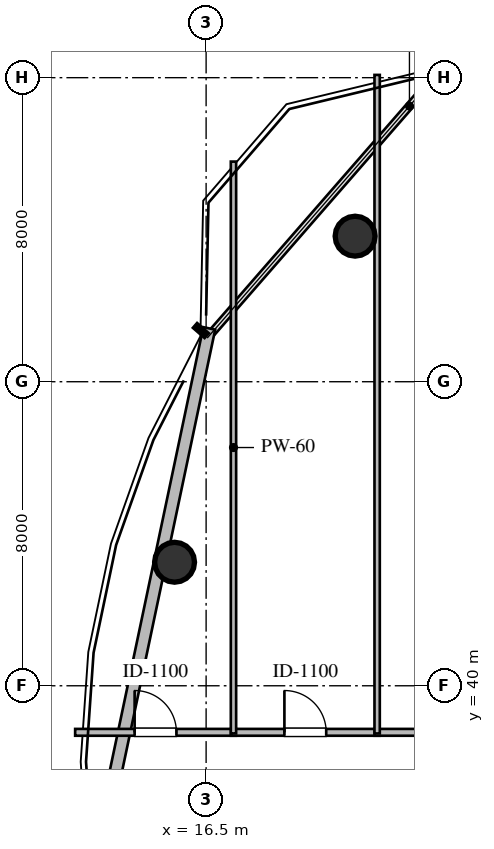
"""IFC4 building model, lengths in metres.
Left out: names, types, materials, properties, quantities, classifications, styles, units other than length and angle.
Written with IfcOpenShell. Run it as: python <this file> out.ifc"""

import sys

from ifc_helpers import new_model, si_unit, direction, frame, frame_2d, origin, origin_2d, place, context, subcontext, project, spatial, rectangle, circle, extrude, element, fill, save


model = new_model("IFC4")
c1 = context("Model", 3, precision=1e-05, world=origin(), true_north=direction((0.0, 1.0)))
c2 = subcontext(c1, "Body", "Model", "MODEL_VIEW")
j1 = project(units=[si_unit("LENGTHUNIT", "METRE"), si_unit("PLANEANGLEUNIT", "RADIAN")], contexts=[c1])
p1 = place(None, origin())
s1 = spatial("IfcSite", under=j1, at=p1, CompositionType="ELEMENT")
p2 = place(p1, origin())
s2 = spatial("IfcBuilding", under=s1, at=p2, CompositionType="ELEMENT")
p3 = place(p2, frame((0.0, 0.0, 199.2)))
s3 = spatial("IfcBuildingStorey", under=s2, at=p3, CompositionType="ELEMENT", Elevation=199.2)
for number, where, z_axis, x_axis in (
    (1, (20.42, 51.83, 0.0), (0.0, 0.0, 1.0), (1.0, 0.0, 0.0)),
    (2, (15.67, 43.25, 0.0), (0.0, 0.0, 1.0), (1.0, 0.0, 0.0)),
):
    element("IfcColumn", number, at=place(p3, frame(where, z_axis=z_axis, x_axis=x_axis)), inside=s3, PredefinedType="COLUMN", context=c2, shape_type="SweptSolid", body=[
        extrude(circle(Radius=0.525, at=origin_2d()), origin(), (0.0, 0.0, 1.0), 3.6),
    ])
p4 = place(p3, frame((13.525, 34.903, 0.0), z_axis=(0.0, 0.0, 1.0), x_axis=(0.206301080321, 0.978488561128, 0.0)))
e3 = element("IfcWall", 3, at=p4, inside=s3, PredefinedType="STANDARD", context=c2, shape_type="SweptSolid", body=[
    extrude(rectangle(XDim=14.819, YDim=0.32, at=frame_2d((7.409, 0.0))), origin(), (0.0, 0.0, 1.0), 2.806),
])
p5 = place(p3, frame((13.054, 38.775, 0.0), z_axis=(0.0, 0.0, 1.0), x_axis=(1.0, 0.0, 0.0)))
e4 = element("IfcWall", 4, at=p5, inside=s3, PredefinedType="PARTITIONING", context=c2, shape_type="SweptSolid", body=[
    extrude(rectangle(XDim=4.231, YDim=0.18, at=frame_2d((2.115, 0.0))), origin(), (0.0, 0.0, 1.0), 3.36),
])
p6 = place(p5, frame((1.565, 0.0, 0.0)))
e5 = element("IfcOpeningElement", 5, at=p6, cuts=e4, PredefinedType="OPENING", context=c2, shape_type="SweptSolid", body=[
    extrude(rectangle(XDim=1.1, YDim=2.1, at=frame_2d((0.55, 1.05))), frame((0.0, 0.1, 0.0), z_axis=(0.0, -1.0, 0.0), x_axis=(1.0, 0.0, 0.0)), (0.0, 0.0, 1.0), 0.2),
])
p7 = place(p3, frame((17.155, 38.775, 0.0), z_axis=(0.0, 0.0, 1.0), x_axis=(1.0, 0.0, 0.0)))
e6 = element("IfcWall", 6, at=p7, inside=s3, PredefinedType="PARTITIONING", context=c2, shape_type="SweptSolid", body=[
    extrude(rectangle(XDim=3.91, YDim=0.18, at=frame_2d((1.955, 0.0))), origin(), (0.0, 0.0, 1.0), 3.36),
])
p8 = place(p7, frame((1.405, 0.0, 0.0)))
e7 = element("IfcOpeningElement", 7, at=p8, cuts=e6, PredefinedType="OPENING", context=c2, shape_type="SweptSolid", body=[
    extrude(rectangle(XDim=1.1, YDim=2.1, at=frame_2d((0.55, 1.05))), frame((0.0, 0.1, 0.0), z_axis=(0.0, -1.0, 0.0), x_axis=(1.0, 0.0, 0.0)), (0.0, 0.0, 1.0), 0.2),
])
p9 = place(p3, frame((20.935, 38.775, 0.0), z_axis=(0.0, 0.0, 1.0), x_axis=(1.0, 0.0, 0.0)))
e8 = element("IfcWall", 8, at=p9, inside=s3, PredefinedType="PARTITIONING", context=c2, shape_type="SweptSolid", body=[
    extrude(rectangle(XDim=5.13, YDim=0.18, at=frame_2d((2.565, 0.0))), origin(), (0.0, 0.0, 1.0), 3.36),
])
p10 = place(p9, frame((2.015, 0.0, 0.0)))
e9 = element("IfcOpeningElement", 9, at=p10, cuts=e8, PredefinedType="OPENING", context=c2, shape_type="SweptSolid", body=[
    extrude(rectangle(XDim=1.1, YDim=2.1, at=frame_2d((0.55, 1.05))), frame((0.0, 0.1, 0.0), z_axis=(0.0, -1.0, 0.0), x_axis=(1.0, 0.0, 0.0)), (0.0, 0.0, 1.0), 0.2),
])
p11 = place(p3, frame((17.22, 53.792, 0.0), z_axis=(0.0, 0.0, 1.0), x_axis=(0.0, -1.0, 0.0)))
e10 = element("IfcWall", 10, at=p11, inside=s3, PredefinedType="PARTITIONING", context=c2, shape_type="SweptSolid", body=[
    extrude(rectangle(XDim=15.047, YDim=0.14, at=frame_2d((7.523, 0.0))), origin(), (0.0, 0.0, 1.0), 2.817),
])
p12 = place(p3, frame((21.0, 56.073, 0.0), z_axis=(0.0, 0.0, 1.0), x_axis=(0.0, -1.0, 0.0)))
e11 = element("IfcWall", 11, at=p12, inside=s3, PredefinedType="PARTITIONING", context=c2, shape_type="SweptSolid", body=[
    extrude(rectangle(XDim=17.328, YDim=0.14, at=frame_2d((8.664, 0.0))), origin(), (0.0, 0.0, 1.0), 2.806),
])
p13 = place(p6, origin())
e12 = element("IfcDoor", 12, at=p13, inside=s3, OperationType="SINGLE_SWING_LEFT", PredefinedType="DOOR", context=c2, shape_type="SweptSolid", body=[
    extrude(rectangle(XDim=1.1, YDim=2.1, at=frame_2d((0.55, 1.05))), frame((0.0, 0.025, 0.0), z_axis=(0.0, -1.0, 0.0), x_axis=(1.0, 0.0, 0.0)), (0.0, 0.0, 1.0), 0.05),
])
fill(e5, e12)
p14 = place(p8, origin())
e13 = element("IfcDoor", 13, at=p14, inside=s3, OperationType="SINGLE_SWING_LEFT", PredefinedType="DOOR", context=c2, shape_type="SweptSolid", body=[
    extrude(rectangle(XDim=1.1, YDim=2.1, at=frame_2d((0.55, 1.05))), frame((0.0, 0.025, 0.0), z_axis=(0.0, -1.0, 0.0), x_axis=(1.0, 0.0, 0.0)), (0.0, 0.0, 1.0), 0.05),
])
fill(e7, e13)
save(model, sys.argv[1])
